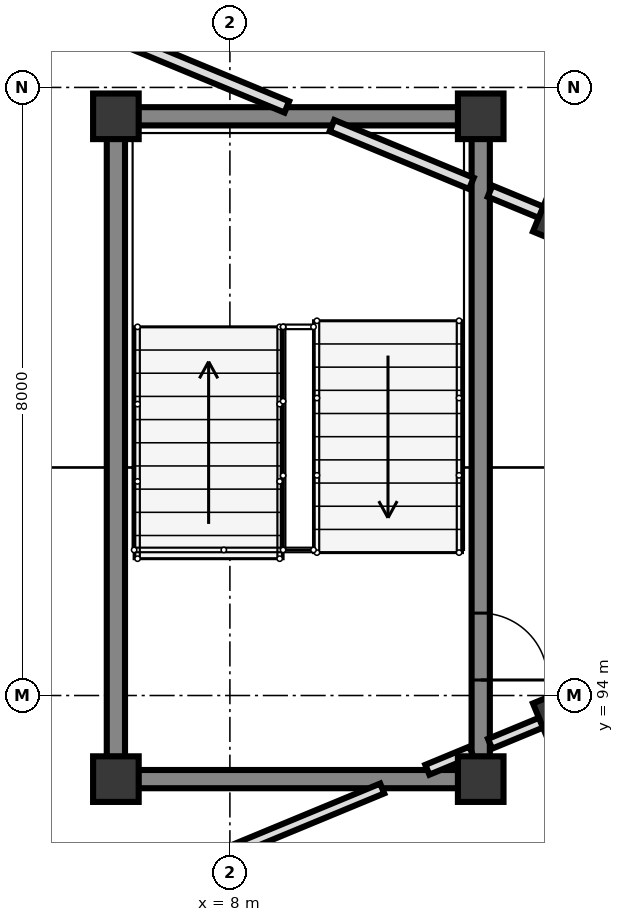
"""IFC4 building model, lengths in metres.
Left out: names, types, materials, properties, quantities, classifications, styles, units other than length and angle.
Written with IfcOpenShell. Run it as: python <this file> out.ifc"""

import sys

from ifc_helpers import new_model, si_unit, direction, frame, frame_2d, origin, origin_2d, place, context, subcontext, project, spatial, rectangle, extrude, element, fill, save


model = new_model("IFC4")
c1 = context("Model", 3, precision=1e-05, world=origin(), true_north=direction((0.0, 1.0)))
c2 = subcontext(c1, "Body", "Model", "MODEL_VIEW")
j1 = project(units=[si_unit("LENGTHUNIT", "METRE"), si_unit("PLANEANGLEUNIT", "RADIAN")], contexts=[c1])
p1 = place(None, origin())
s1 = spatial("IfcSite", under=j1, at=p1, CompositionType="ELEMENT")
p2 = place(p1, origin())
s2 = spatial("IfcBuilding", under=s1, at=p2, CompositionType="ELEMENT")
p3 = place(p2, frame((0.0, 0.0, 4.5)))
s3 = spatial("IfcBuildingStorey", under=s2, at=p3, CompositionType="ELEMENT", Elevation=4.5)
for number, where, z_axis, x_axis in (
    (1, (6.5, 92.9, 0.0), (0.0, 0.0, 1.0), (1.0, 0.0, 0.0)),
    (2, (11.3, 92.9, 0.0), (0.0, 0.0, 1.0), (1.0, 0.0, 0.0)),
    (3, (11.3, 101.62, 0.0), (0.0, 0.0, 1.0), (1.0, 0.0, 0.0)),
    (4, (6.5, 101.62, 0.0), (0.0, 0.0, 1.0), (1.0, 0.0, 0.0)),
):
    element("IfcColumn", number, at=place(p3, frame(where, z_axis=z_axis, x_axis=x_axis)), inside=s3, PredefinedType="COLUMN", context=c2, shape_type="SweptSolid", body=[
        extrude(rectangle(XDim=0.6, YDim=0.6, at=origin_2d()), origin(), (0.0, 0.0, 1.0), 4.0),
    ])
for number, where, z_axis, x_axis in (
    (5, (12.347, 100.253, 0.0), (0.0, 0.0, 1.0), (-0.924, 0.383, 0.0)),
    (6, (12.347, 93.747, 0.0), (0.0, 0.0, 1.0), (-0.924, -0.383, 0.0)),
):
    element("IfcColumn", number, at=place(p3, frame(where, z_axis=z_axis, x_axis=x_axis)), inside=s3, PredefinedType="COLUMN", context=c2, shape_type="SweptSolid", body=[
        extrude(rectangle(XDim=0.55, YDim=0.55, at=origin_2d()), origin(), (0.0, 0.0, 1.0), 4.0),
    ])
p4 = place(p3, frame((6.5, 93.192, 0.0), z_axis=(0.0, 0.0, 1.0), x_axis=(0.0, 1.0, 0.0)))
e7 = element("IfcWall", 7, at=p4, inside=s3, PredefinedType="SHEAR", context=c2, shape_type="SweptSolid", body=[
    extrude(rectangle(XDim=8.136, YDim=0.24, at=frame_2d((4.068, 0.0))), origin(), (0.0, 0.0, 1.0), 3.74),
])
p5 = place(p3, frame((11.3, 101.328, 0.0), z_axis=(0.0, 0.0, 1.0), x_axis=(0.0, -1.0, 0.0)))
e8 = element("IfcWall", 8, at=p5, inside=s3, PredefinedType="SHEAR", context=c2, shape_type="SweptSolid", body=[
    extrude(rectangle(XDim=8.136, YDim=0.24, at=frame_2d((4.068, 0.0))), origin(), (0.0, 0.0, 1.0), 3.74),
])
p6 = place(p5, frame((6.244, 0.0, 0.0)))
e9 = element("IfcOpeningElement", 9, at=p6, cuts=e8, PredefinedType="OPENING", context=c2, shape_type="SweptSolid", body=[
    extrude(rectangle(XDim=0.88, YDim=2.1, at=frame_2d((0.44, 1.05))), frame((0.0, 0.13, 0.0), z_axis=(0.0, -1.0, 0.0), x_axis=(1.0, 0.0, 0.0)), (0.0, 0.0, 1.0), 0.26),
])
for number, where, z_axis, x_axis in (
    (10, (11.008, 92.9, 0.0), (0.0, 0.0, 1.0), (-1.0, 0.0, 0.0)),
    (11, (11.008, 101.62, 0.0), (0.0, 0.0, 1.0), (-1.0, 0.0, 0.0)),
):
    element("IfcWall", number, at=place(p3, frame(where, z_axis=z_axis, x_axis=x_axis)), inside=s3, PredefinedType="SHEAR", context=c2, shape_type="SweptSolid", body=[
        extrude(rectangle(XDim=4.216, YDim=0.24, at=frame_2d((2.108, 0.0))), origin(), (0.0, 0.0, 1.0), 3.74),
    ])
p7 = place(p3, frame((12.1, 100.355, 0.0), z_axis=(0.0, 0.0, 1.0), x_axis=(-0.924069600435, 0.382224245113, 0.0)))
e12 = element("IfcWall", 12, at=p7, inside=s3, PredefinedType="PARTITIONING", context=c2, shape_type="SweptSolid", body=[
    extrude(rectangle(XDim=0.733, YDim=0.16, at=frame_2d((0.366, 0.0))), origin(), (0.0, 0.0, 1.0), 3.7),
])
p8 = place(p3, frame((11.177, 100.737, 0.0), z_axis=(0.0, 0.0, 1.0), x_axis=(-0.923817443679, 0.382833293686, 0.0)))
e13 = element("IfcWall", 13, at=p8, inside=s3, PredefinedType="PARTITIONING", context=c2, shape_type="SweptSolid", body=[
    extrude(rectangle(XDim=1.985, YDim=0.16, at=frame_2d((0.993, 0.0))), origin(), (0.0, 0.0, 1.0), 3.7),
])
p9 = place(p3, frame((8.749, 101.743, 0.0), z_axis=(0.0, 0.0, 1.0), x_axis=(-0.923877739946, 0.382687759972, 0.0)))
e14 = element("IfcWall", 14, at=p9, inside=s3, PredefinedType="PARTITIONING", context=c2, shape_type="SweptSolid", body=[
    extrude(rectangle(XDim=4.813, YDim=0.16, at=frame_2d((2.407, 0.0))), origin(), (0.0, 0.0, 1.0), 3.7),
])
p10 = place(p3, frame((12.1, 93.645, 0.0), z_axis=(0.0, 0.0, 1.0), x_axis=(-0.924069600435, -0.382224245113, 0.0)))
e15 = element("IfcWall", 15, at=p10, inside=s3, PredefinedType="PARTITIONING", context=c2, shape_type="SweptSolid", body=[
    extrude(rectangle(XDim=0.733, YDim=0.14, at=frame_2d((0.366, 0.0))), origin(), (0.0, 0.0, 1.0), 3.072),
])
p11 = place(p3, frame((11.177, 93.263, 0.0), z_axis=(0.0, 0.0, 1.0), x_axis=(-0.923812676193, -0.382844797933, 0.0)))
e16 = element("IfcWall", 16, at=p11, inside=s3, PredefinedType="PARTITIONING", context=c2, shape_type="SweptSolid", body=[
    extrude(rectangle(XDim=0.627, YDim=0.14, at=frame_2d((0.313, 0.0))), origin(), (0.0, 0.0, 1.0), 3.072),
])
p12 = place(p3, frame((10.004, 92.777, 0.0), z_axis=(0.0, 0.0, 1.0), x_axis=(-0.923864955254, -0.382718623082, 0.0)))
e17 = element("IfcWall", 17, at=p12, inside=s3, PredefinedType="PARTITIONING", context=c2, shape_type="SweptSolid", body=[
    extrude(rectangle(XDim=6.172, YDim=0.14, at=frame_2d((3.086, 0.0))), origin(), (0.0, 0.0, 1.0), 3.072),
])
p13 = place(p6, origin())
e18 = element("IfcDoor", 18, at=p13, inside=s3, OperationType="SINGLE_SWING_RIGHT", PredefinedType="DOOR", context=c2, shape_type="SweptSolid", body=[
    extrude(rectangle(XDim=0.88, YDim=2.1, at=frame_2d((0.44, 1.05))), frame((0.0, 0.025, 0.0), z_axis=(0.0, -1.0, 0.0), x_axis=(1.0, 0.0, 0.0)), (0.0, 0.0, 1.0), 0.05),
])
fill(e9, e18)
save(model, sys.argv[1])
